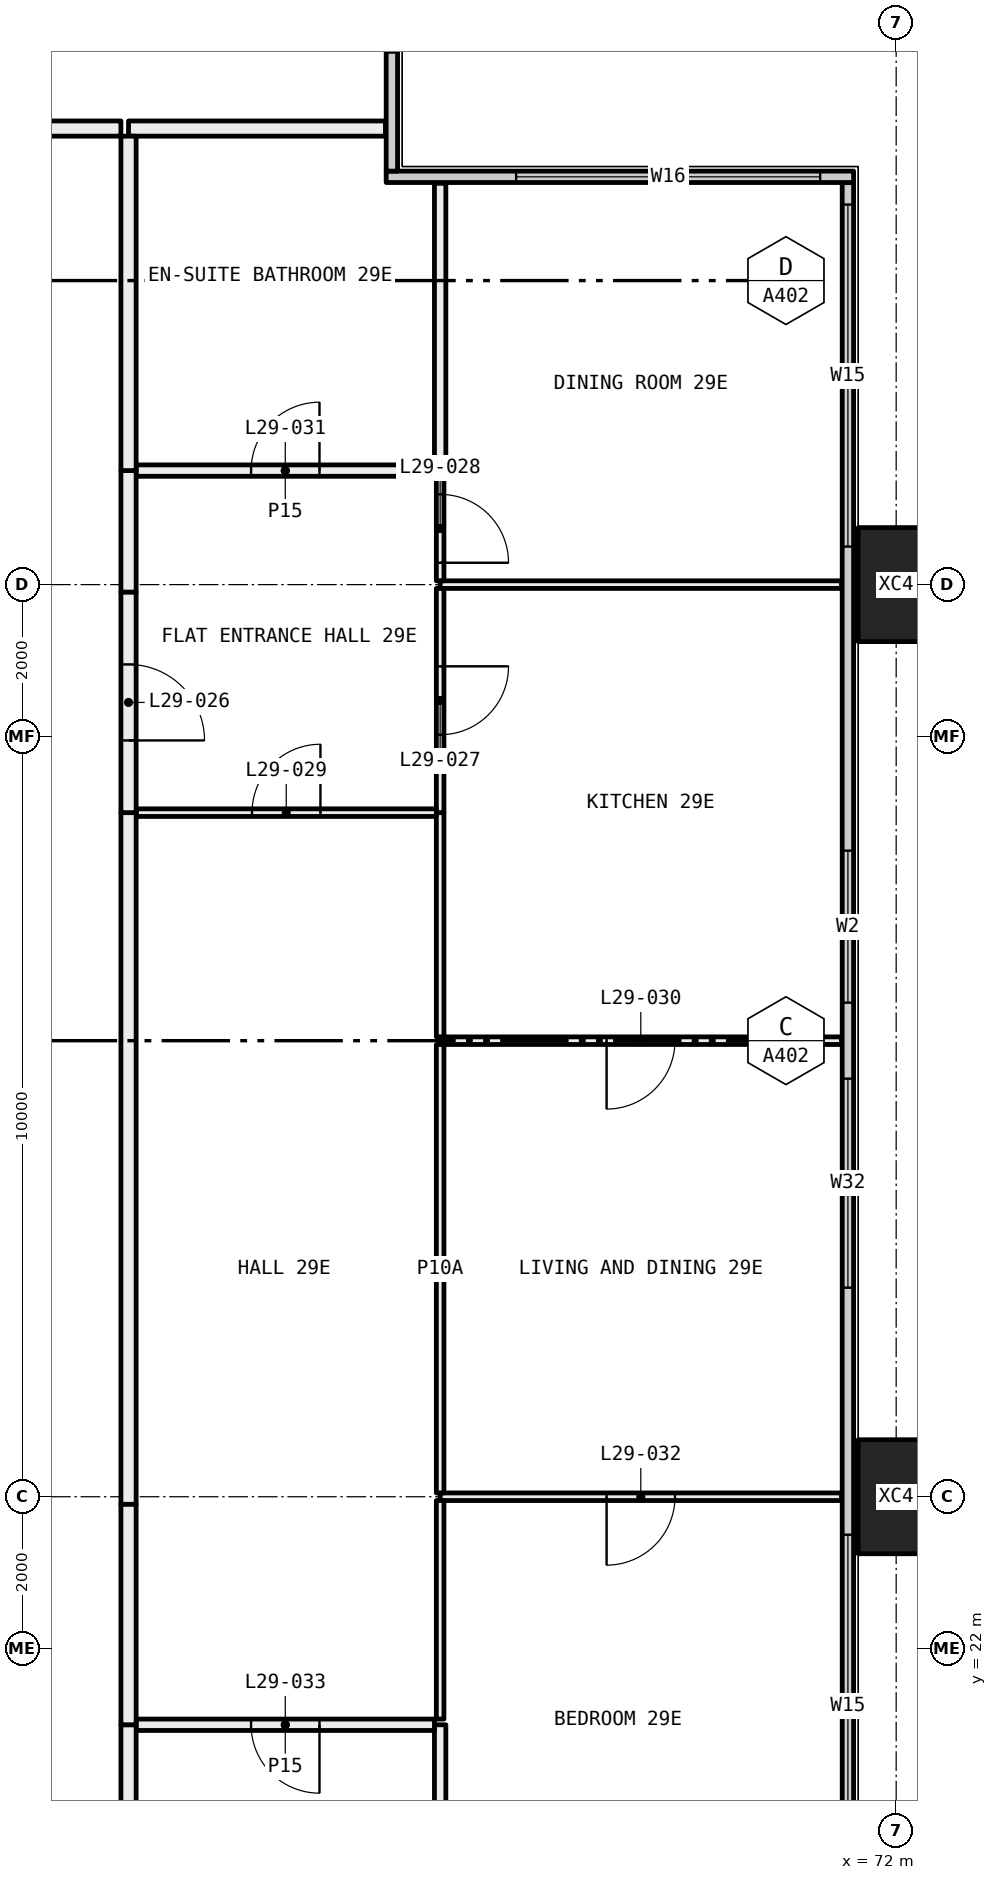
"""IFC4 building model, lengths in metres.
Left out: names, types, materials, properties, quantities, classifications, styles, units other than length and angle.
Written with IfcOpenShell. Run it as: python <this file> out.ifc"""

import sys

from ifc_helpers import new_model, si_unit, direction, frame, frame_2d, origin, origin_2d, place, context, subcontext, project, spatial, rectangle, hollow_rectangle, extrude, element, fill, save


model = new_model("IFC4")
c1 = context("Model", 3, precision=1e-05, world=origin(), true_north=direction((0.0, 1.0)))
c2 = subcontext(c1, "Body", "Model", "MODEL_VIEW")
j1 = project(units=[si_unit("LENGTHUNIT", "METRE"), si_unit("PLANEANGLEUNIT", "RADIAN")], contexts=[c1])
p1 = place(None, origin())
s1 = spatial("IfcSite", under=j1, at=p1, CompositionType="ELEMENT")
p2 = place(p1, origin())
s2 = spatial("IfcBuilding", under=s1, at=p2, CompositionType="ELEMENT")
p3 = place(p2, frame((0.0, 0.0, 113.85)))
s3 = spatial("IfcBuildingStorey", under=s2, at=p3, CompositionType="ELEMENT", Elevation=113.85)
for number, where, z_axis, x_axis in (
    (1, (72.0, 24.0, -0.4), (0.0, 0.0, 1.0), (0.0, 1.0, 0.0)),
    (2, (72.0, 36.0, -0.4), (0.0, 0.0, 1.0), (0.0, 1.0, 0.0)),
):
    element("IfcColumn", number, at=place(p3, frame(where, z_axis=z_axis, x_axis=x_axis)), inside=s3, PredefinedType="COLUMN", context=c2, shape_type="SweptSolid", body=[
        extrude(hollow_rectangle(XDim=1.5, YDim=1.0, WallThickness=0.06, at=origin_2d()), origin(), (0.0, 0.0, 1.0), 3.45),
    ])
p4 = place(p3, frame((71.365, 18.71, 0.0), z_axis=(0.0, 0.0, 1.0), x_axis=(0.0, 1.0, 0.0)))
e3 = element("IfcWall", 3, at=p4, inside=s3, PredefinedType="ELEMENTEDWALL", context=c2, shape_type="SweptSolid", body=[
    extrude(rectangle(XDim=22.58, YDim=0.15, at=frame_2d((11.29, 0.0))), origin(), (0.0, 0.0, 1.0), 3.05),
])
p5 = place(p4, frame((0.29, 0.0, 0.45)))
e4 = element("IfcOpeningElement", 4, at=p5, cuts=e3, PredefinedType="OPENING", context=c2, shape_type="SweptSolid", body=[
    extrude(rectangle(XDim=4.5, YDim=2.55, at=frame_2d((2.25, 1.275))), frame((0.0, 0.085, 0.0), z_axis=(0.0, -1.0, 0.0), x_axis=(1.0, 0.0, 0.0)), (0.0, 0.0, 1.0), 0.17),
])
p6 = place(p4, frame((8.04, 0.0, 0.45)))
e5 = element("IfcOpeningElement", 5, at=p6, cuts=e3, PredefinedType="OPENING", context=c2, shape_type="SweptSolid", body=[
    extrude(rectangle(XDim=2.75, YDim=2.55, at=frame_2d((1.375, 1.275))), frame((0.0, 0.085, 0.0), z_axis=(0.0, -1.0, 0.0), x_axis=(1.0, 0.0, 0.0)), (0.0, 0.0, 1.0), 0.17),
])
p7 = place(p4, frame((11.79, 0.0, 0.45)))
e6 = element("IfcOpeningElement", 6, at=p7, cuts=e3, PredefinedType="OPENING", context=c2, shape_type="SweptSolid", body=[
    extrude(rectangle(XDim=2.0, YDim=2.55, at=frame_2d((1.0, 1.275))), frame((0.0, 0.085, 0.0), z_axis=(0.0, -1.0, 0.0), x_axis=(1.0, 0.0, 0.0)), (0.0, 0.0, 1.0), 0.17),
])
p8 = place(p4, frame((17.79, 0.0, 0.45)))
e7 = element("IfcOpeningElement", 7, at=p8, cuts=e3, PredefinedType="OPENING", context=c2, shape_type="SweptSolid", body=[
    extrude(rectangle(XDim=4.5, YDim=2.55, at=frame_2d((2.25, 1.275))), frame((0.0, 0.085, 0.0), z_axis=(0.0, -1.0, 0.0), x_axis=(1.0, 0.0, 0.0)), (0.0, 0.0, 1.0), 0.17),
])
p9 = place(p3, frame((65.29, 41.365, 0.0), z_axis=(0.0, 0.0, 1.0), x_axis=(1.0, 0.0, 0.0)))
e8 = element("IfcWall", 8, at=p9, inside=s3, PredefinedType="ELEMENTEDWALL", context=c2, shape_type="SweptSolid", body=[
    extrude(rectangle(XDim=6.15, YDim=0.15, at=frame_2d((3.075, 0.0))), origin(), (0.0, 0.0, 1.0), 3.05),
])
p10 = place(p9, frame((1.71, 0.0, 0.45)))
e9 = element("IfcOpeningElement", 9, at=p10, cuts=e8, PredefinedType="OPENING", context=c2, shape_type="SweptSolid", body=[
    extrude(rectangle(XDim=4.0, YDim=2.55, at=frame_2d((2.0, 1.275))), frame((0.0, 0.085, 0.0), z_axis=(0.0, -1.0, 0.0), x_axis=(1.0, 0.0, 0.0)), (0.0, 0.0, 1.0), 0.17),
])
p11 = place(p3, frame((65.365, 41.44, 0.0), z_axis=(0.0, 0.0, 1.0), x_axis=(0.0, 1.0, 0.0)))
e10 = element("IfcWall", 10, at=p11, inside=s3, PredefinedType="ELEMENTEDWALL", context=c2, shape_type="SweptSolid", body=[
    extrude(rectangle(XDim=5.85, YDim=0.15, at=frame_2d((2.925, 0.0))), origin(), (0.0, 0.0, 1.0), 3.05),
])
p12 = place(p11, frame((1.56, 0.0, 0.45)))
e11 = element("IfcOpeningElement", 11, at=p12, cuts=e10, PredefinedType="OPENING", context=c2, shape_type="SweptSolid", body=[
    extrude(rectangle(XDim=4.0, YDim=2.55, at=frame_2d((2.0, 1.275))), frame((0.0, 0.085, 0.0), z_axis=(0.0, -1.0, 0.0), x_axis=(1.0, 0.0, 0.0)), (0.0, 0.0, 1.0), 0.17),
])
p13 = place(p3, frame((71.28, 24.0, 0.0), z_axis=(0.0, 0.0, 1.0), x_axis=(-1.0, 0.0, 0.0)))
e12 = element("IfcWall", 12, at=p13, inside=s3, PredefinedType="PARTITIONING", context=c2, shape_type="SweptSolid", body=[
    extrude(rectangle(XDim=5.28, YDim=0.1, at=frame_2d((2.64, 0.0))), origin(), (0.0, 0.0, 1.0), 2.45),
])
p14 = place(p13, frame((2.19, 0.0, 0.0)))
e13 = element("IfcOpeningElement", 13, at=p14, cuts=e12, PredefinedType="OPENING", context=c2, shape_type="SweptSolid", body=[
    extrude(rectangle(XDim=0.9, YDim=2.1, at=frame_2d((0.45, 1.05))), frame((0.0, 0.06, 0.0), z_axis=(0.0, -1.0, 0.0), x_axis=(1.0, 0.0, 0.0)), (0.0, 0.0, 1.0), 0.12),
])
p15 = place(p3, frame((66.0, 21.0, 0.0), z_axis=(0.0, 0.0, 1.0), x_axis=(0.0, -1.0, 0.0)))
e14 = element("IfcWall", 14, at=p15, inside=s3, PredefinedType="PARTITIONING", context=c2, shape_type="SweptSolid", body=[
    extrude(rectangle(XDim=2.28, YDim=0.15, at=frame_2d((1.14, 0.0))), origin(), (0.0, 0.0, 1.0), 3.05),
])
p16 = place(p3, frame((66.0, 23.95, 0.0), z_axis=(0.0, 0.0, 1.0), x_axis=(0.0, -1.0, 0.0)))
e15 = element("IfcWall", 15, at=p16, inside=s3, PredefinedType="PARTITIONING", context=c2, shape_type="SweptSolid", body=[
    extrude(rectangle(XDim=2.875, YDim=0.1, at=frame_2d((1.438, 0.0))), origin(), (0.0, 0.0, 1.0), 2.45),
])
p17 = place(p3, frame((71.28, 30.0, 0.0), z_axis=(0.0, 0.0, 1.0), x_axis=(-1.0, 0.0, 0.0)))
e16 = element("IfcWall", 16, at=p17, inside=s3, PredefinedType="PARTITIONING", context=c2, shape_type="SweptSolid", body=[
    extrude(rectangle(XDim=5.28, YDim=0.1, at=frame_2d((2.64, 0.0))), origin(), (0.0, 0.0, 1.0), 3.05),
])
p18 = place(p17, frame((2.19, 0.0, 0.0)))
e17 = element("IfcOpeningElement", 17, at=p18, cuts=e16, PredefinedType="OPENING", context=c2, shape_type="SweptSolid", body=[
    extrude(rectangle(XDim=0.9, YDim=2.1, at=frame_2d((0.45, 1.05))), frame((0.0, 0.06, 0.0), z_axis=(0.0, -1.0, 0.0), x_axis=(1.0, 0.0, 0.0)), (0.0, 0.0, 1.0), 0.12),
])
p19 = place(p3, frame((66.0, 29.95, 0.0), z_axis=(0.0, 0.0, 1.0), x_axis=(0.0, -1.0, 0.0)))
e18 = element("IfcWall", 18, at=p19, inside=s3, PredefinedType="PARTITIONING", context=c2, shape_type="SweptSolid", body=[
    extrude(rectangle(XDim=5.9, YDim=0.1, at=frame_2d((2.95, 0.0))), origin(), (0.0, 0.0, 1.0), 2.45),
])
p20 = place(p3, frame((71.28, 36.0, 0.0), z_axis=(0.0, 0.0, 1.0), x_axis=(-1.0, 0.0, 0.0)))
e19 = element("IfcWall", 19, at=p20, inside=s3, PredefinedType="PARTITIONING", context=c2, shape_type="SweptSolid", body=[
    extrude(rectangle(XDim=5.28, YDim=0.1, at=frame_2d((2.64, 0.0))), origin(), (0.0, 0.0, 1.0), 2.45),
])
p21 = place(p3, frame((66.0, 33.0, 0.0), z_axis=(0.0, 0.0, 1.0), x_axis=(0.0, -1.0, 0.0)))
e20 = element("IfcWall", 20, at=p21, inside=s3, PredefinedType="PARTITIONING", context=c2, shape_type="SweptSolid", body=[
    extrude(rectangle(XDim=2.95, YDim=0.1, at=frame_2d((1.475, 0.0))), origin(), (0.0, 0.0, 1.0), 3.05),
])
p22 = place(p3, frame((66.0, 35.95, 0.0), z_axis=(0.0, 0.0, 1.0), x_axis=(0.0, -1.0, 0.0)))
e21 = element("IfcWall", 21, at=p22, inside=s3, PredefinedType="PARTITIONING", context=c2, shape_type="SweptSolid", body=[
    extrude(rectangle(XDim=2.95, YDim=0.1, at=frame_2d((1.475, 0.0))), origin(), (0.0, 0.0, 1.0), 2.45),
])
p23 = place(p22, frame((1.025, 0.0, 0.0)))
e22 = element("IfcOpeningElement", 22, at=p23, cuts=e21, PredefinedType="OPENING", context=c2, shape_type="SweptSolid", body=[
    extrude(rectangle(XDim=0.9, YDim=2.1, at=frame_2d((0.45, 1.05))), frame((0.0, 0.06, 0.0), z_axis=(0.0, -1.0, 0.0), x_axis=(1.0, 0.0, 0.0)), (0.0, 0.0, 1.0), 0.12),
])
p24 = place(p3, frame((66.0, 37.425, 0.0), z_axis=(0.0, 0.0, 1.0), x_axis=(0.0, -1.0, 0.0)))
e23 = element("IfcWall", 23, at=p24, inside=s3, PredefinedType="PARTITIONING", context=c2, shape_type="SweptSolid", body=[
    extrude(rectangle(XDim=1.375, YDim=0.1, at=frame_2d((0.688, 0.0))), origin(), (0.0, 0.0, 1.0), 2.45),
])
p25 = place(p24, frame((0.238, 0.0, 0.0)))
e24 = element("IfcOpeningElement", 24, at=p25, cuts=e23, PredefinedType="OPENING", context=c2, shape_type="SweptSolid", body=[
    extrude(rectangle(XDim=0.9, YDim=2.1, at=frame_2d((0.45, 1.05))), frame((0.0, 0.06, 0.0), z_axis=(0.0, -1.0, 0.0), x_axis=(1.0, 0.0, 0.0)), (0.0, 0.0, 1.0), 0.12),
])
p26 = place(p3, frame((66.0, 41.28, 0.0), z_axis=(0.0, 0.0, 1.0), x_axis=(0.0, -1.0, 0.0)))
e25 = element("IfcWall", 25, at=p26, inside=s3, PredefinedType="PARTITIONING", context=c2, shape_type="SweptSolid", body=[
    extrude(rectangle(XDim=3.78, YDim=0.15, at=frame_2d((1.89, 0.0))), origin(), (0.0, 0.0, 1.0), 3.05),
])
p27 = place(p3, frame((65.925, 21.0, 0.0), z_axis=(0.0, 0.0, 1.0), x_axis=(-1.0, 0.0, 0.0)))
e26 = element("IfcWall", 26, at=p27, inside=s3, PredefinedType="PARTITIONING", context=c2, shape_type="SweptSolid", body=[
    extrude(rectangle(XDim=3.925, YDim=0.15, at=frame_2d((1.962, 0.0))), origin(), (0.0, 0.0, 1.0), 3.05),
])
p28 = place(p27, frame((1.512, 0.0, 0.0)))
e27 = element("IfcOpeningElement", 27, at=p28, cuts=e26, PredefinedType="OPENING", context=c2, shape_type="SweptSolid", body=[
    extrude(rectangle(XDim=0.9, YDim=2.1, at=frame_2d((0.45, 1.05))), frame((0.0, 0.085, 0.0), z_axis=(0.0, -1.0, 0.0), x_axis=(1.0, 0.0, 0.0)), (0.0, 0.0, 1.0), 0.17),
])
p29 = place(p3, frame((61.9, 21.0, 0.0), z_axis=(0.0, 0.0, 1.0), x_axis=(0.0, -1.0, 0.0)))
e28 = element("IfcWall", 28, at=p29, inside=s3, PredefinedType="PARTITIONING", context=c2, shape_type="SweptSolid", body=[
    extrude(rectangle(XDim=2.9, YDim=0.2, at=frame_2d((1.45, 0.0))), origin(), (0.0, 0.0, 1.0), 3.05),
])
p30 = place(p3, frame((65.95, 33.0, 0.0), z_axis=(0.0, 0.0, 1.0), x_axis=(-1.0, 0.0, 0.0)))
e29 = element("IfcWall", 29, at=p30, inside=s3, PredefinedType="PARTITIONING", context=c2, shape_type="SweptSolid", body=[
    extrude(rectangle(XDim=3.95, YDim=0.1, at=frame_2d((1.975, 0.0))), origin(), (0.0, 0.0, 1.0), 3.05),
])
p31 = place(p30, frame((1.525, 0.0, 0.0)))
e30 = element("IfcOpeningElement", 30, at=p31, cuts=e29, PredefinedType="OPENING", context=c2, shape_type="SweptSolid", body=[
    extrude(rectangle(XDim=0.9, YDim=2.1, at=frame_2d((0.45, 1.05))), frame((0.0, 0.06, 0.0), z_axis=(0.0, -1.0, 0.0), x_axis=(1.0, 0.0, 0.0)), (0.0, 0.0, 1.0), 0.12),
])
p32 = place(p3, frame((61.9, 33.0, 0.0), z_axis=(0.0, 0.0, 1.0), x_axis=(0.0, -1.0, 0.0)))
e31 = element("IfcWall", 31, at=p32, inside=s3, PredefinedType="PARTITIONING", context=c2, shape_type="SweptSolid", body=[
    extrude(rectangle(XDim=9.1, YDim=0.2, at=frame_2d((4.55, 0.0))), origin(), (0.0, 0.0, 1.0), 2.45),
])
p33 = place(p3, frame((61.9, 23.9, 0.0), z_axis=(0.0, 0.0, 1.0), x_axis=(0.0, -1.0, 0.0)))
e32 = element("IfcWall", 32, at=p33, inside=s3, PredefinedType="PARTITIONING", context=c2, shape_type="SweptSolid", body=[
    extrude(rectangle(XDim=2.9, YDim=0.2, at=frame_2d((1.45, 0.0))), origin(), (0.0, 0.0, 1.0), 3.05),
])
p34 = place(p3, frame((65.925, 37.5, 0.0), z_axis=(0.0, 0.0, 1.0), x_axis=(-1.0, 0.0, 0.0)))
e33 = element("IfcWall", 33, at=p34, inside=s3, PredefinedType="PARTITIONING", context=c2, shape_type="SweptSolid", body=[
    extrude(rectangle(XDim=3.925, YDim=0.15, at=frame_2d((1.962, 0.0))), origin(), (0.0, 0.0, 1.0), 3.05),
])
p35 = place(p34, frame((1.512, 0.0, 0.0)))
e34 = element("IfcOpeningElement", 34, at=p35, cuts=e33, PredefinedType="OPENING", context=c2, shape_type="SweptSolid", body=[
    extrude(rectangle(XDim=0.9, YDim=2.1, at=frame_2d((0.45, 1.05))), frame((0.0, 0.085, 0.0), z_axis=(0.0, -1.0, 0.0), x_axis=(1.0, 0.0, 0.0)), (0.0, 0.0, 1.0), 0.17),
])
p36 = place(p3, frame((61.9, 37.5, 0.0), z_axis=(0.0, 0.0, 1.0), x_axis=(0.0, -1.0, 0.0)))
e35 = element("IfcWall", 35, at=p36, inside=s3, PredefinedType="PARTITIONING", context=c2, shape_type="SweptSolid", body=[
    extrude(rectangle(XDim=1.6, YDim=0.2, at=frame_2d((0.8, 0.0))), origin(), (0.0, 0.0, 1.0), 2.45),
])
p37 = place(p3, frame((61.9, 35.9, 0.0), z_axis=(0.0, 0.0, 1.0), x_axis=(0.0, -1.0, 0.0)))
e36 = element("IfcWall", 36, at=p37, inside=s3, PredefinedType="PARTITIONING", context=c2, shape_type="SweptSolid", body=[
    extrude(rectangle(XDim=2.9, YDim=0.2, at=frame_2d((1.45, 0.0))), origin(), (0.0, 0.0, 1.0), 3.05),
])
p38 = place(p37, frame((0.95, 0.0, 0.0)))
e37 = element("IfcOpeningElement", 37, at=p38, cuts=e36, PredefinedType="OPENING", context=c2, shape_type="SweptSolid", body=[
    extrude(rectangle(XDim=1.0, YDim=2.1, at=frame_2d((0.5, 1.05))), frame((0.0, 0.11, 0.0), z_axis=(0.0, -1.0, 0.0), x_axis=(1.0, 0.0, 0.0)), (0.0, 0.0, 1.0), 0.22),
])
p39 = place(p3, frame((65.28, 42.0, 0.0), z_axis=(0.0, 0.0, 1.0), x_axis=(-1.0, 0.0, 0.0)))
e38 = element("IfcWall", 38, at=p39, inside=s3, PredefinedType="PARTITIONING", context=c2, shape_type="SweptSolid", body=[
    extrude(rectangle(XDim=3.38, YDim=0.2, at=frame_2d((1.69, 0.0))), origin(), (0.0, 0.0, 1.0), 3.05),
])
p40 = place(p3, frame((61.9, 41.9, 0.0), z_axis=(0.0, 0.0, 1.0), x_axis=(0.0, -1.0, 0.0)))
e39 = element("IfcWall", 39, at=p40, inside=s3, PredefinedType="PARTITIONING", context=c2, shape_type="SweptSolid", body=[
    extrude(rectangle(XDim=4.4, YDim=0.2, at=frame_2d((2.2, 0.0))), origin(), (0.0, 0.0, 1.0), 3.05),
])
p41 = place(p3, frame((60.0, 42.0, 0.0), z_axis=(0.0, 0.0, 1.0), x_axis=(1.0, 0.0, 0.0)))
e40 = element("IfcWall", 40, at=p41, inside=s3, PredefinedType="PARTITIONING", context=c2, shape_type="SweptSolid", body=[
    extrude(rectangle(XDim=1.8, YDim=0.2, at=frame_2d((0.9, 0.0))), origin(), (0.0, 0.0, 1.0), 3.05),
])
p42 = place(p5, origin())
e41 = element("IfcWindow", 41, at=p42, inside=s3, PartitioningType="SINGLE_PANEL", PredefinedType="WINDOW", context=c2, shape_type="SweptSolid", body=[
    extrude(rectangle(XDim=4.5, YDim=2.55, at=frame_2d((2.25, 1.275))), frame((0.0, 0.03, 0.0), z_axis=(0.0, -1.0, 0.0), x_axis=(1.0, 0.0, 0.0)), (0.0, 0.0, 1.0), 0.06),
])
fill(e4, e41)
p43 = place(p6, origin())
e42 = element("IfcWindow", 42, at=p43, inside=s3, PartitioningType="SINGLE_PANEL", PredefinedType="WINDOW", context=c2, shape_type="SweptSolid", body=[
    extrude(rectangle(XDim=2.75, YDim=2.55, at=frame_2d((1.375, 1.275))), frame((0.0, 0.03, 0.0), z_axis=(0.0, -1.0, 0.0), x_axis=(1.0, 0.0, 0.0)), (0.0, 0.0, 1.0), 0.06),
])
fill(e5, e42)
p44 = place(p7, origin())
e43 = element("IfcWindow", 43, at=p44, inside=s3, PartitioningType="SINGLE_PANEL", PredefinedType="WINDOW", context=c2, shape_type="SweptSolid", body=[
    extrude(rectangle(XDim=2.0, YDim=2.55, at=frame_2d((1.0, 1.275))), frame((0.0, 0.03, 0.0), z_axis=(0.0, -1.0, 0.0), x_axis=(1.0, 0.0, 0.0)), (0.0, 0.0, 1.0), 0.06),
])
fill(e6, e43)
p45 = place(p8, origin())
e44 = element("IfcWindow", 44, at=p45, inside=s3, PartitioningType="SINGLE_PANEL", PredefinedType="WINDOW", context=c2, shape_type="SweptSolid", body=[
    extrude(rectangle(XDim=4.5, YDim=2.55, at=frame_2d((2.25, 1.275))), frame((0.0, 0.03, 0.0), z_axis=(0.0, -1.0, 0.0), x_axis=(1.0, 0.0, 0.0)), (0.0, 0.0, 1.0), 0.06),
])
fill(e7, e44)
p46 = place(p10, origin())
e45 = element("IfcWindow", 45, at=p46, inside=s3, PartitioningType="SINGLE_PANEL", PredefinedType="WINDOW", context=c2, shape_type="SweptSolid", body=[
    extrude(rectangle(XDim=4.0, YDim=2.55, at=frame_2d((2.0, 1.275))), frame((0.0, 0.03, 0.0), z_axis=(0.0, -1.0, 0.0), x_axis=(1.0, 0.0, 0.0)), (0.0, 0.0, 1.0), 0.06),
])
fill(e9, e45)
p47 = place(p38, origin())
e46 = element("IfcDoor", 46, at=p47, inside=s3, OperationType="SINGLE_SWING_LEFT", PredefinedType="DOOR", context=c2, shape_type="SweptSolid", body=[
    extrude(rectangle(XDim=1.0, YDim=2.1, at=frame_2d((0.5, 1.05))), frame((0.0, 0.025, 0.0), z_axis=(0.0, -1.0, 0.0), x_axis=(1.0, 0.0, 0.0)), (0.0, 0.0, 1.0), 0.05),
])
fill(e37, e46)
p48 = place(p23, origin())
e47 = element("IfcDoor", 47, at=p48, inside=s3, OperationType="SINGLE_SWING_RIGHT", PredefinedType="DOOR", context=c2, shape_type="SweptSolid", body=[
    extrude(rectangle(XDim=0.9, YDim=2.1, at=frame_2d((0.45, 1.05))), frame((0.0, 0.025, 0.0), z_axis=(0.0, -1.0, 0.0), x_axis=(1.0, 0.0, 0.0)), (0.0, 0.0, 1.0), 0.05),
])
fill(e22, e47)
p49 = place(p25, origin())
e48 = element("IfcDoor", 48, at=p49, inside=s3, OperationType="SINGLE_SWING_LEFT", PredefinedType="DOOR", context=c2, shape_type="SweptSolid", body=[
    extrude(rectangle(XDim=0.9, YDim=2.1, at=frame_2d((0.45, 1.05))), frame((0.0, 0.025, 0.0), z_axis=(0.0, -1.0, 0.0), x_axis=(1.0, 0.0, 0.0)), (0.0, 0.0, 1.0), 0.05),
])
fill(e24, e48)
p50 = place(p31, frame((0.9, 0.0, 0.0), x_axis=(-1.0, 0.0, 0.0)))
e49 = element("IfcDoor", 49, at=p50, inside=s3, OperationType="SINGLE_SWING_LEFT", PredefinedType="DOOR", context=c2, shape_type="SweptSolid", body=[
    extrude(rectangle(XDim=0.9, YDim=2.1, at=frame_2d((0.45, 1.05))), frame((0.0, 0.025, 0.0), z_axis=(0.0, -1.0, 0.0), x_axis=(1.0, 0.0, 0.0)), (0.0, 0.0, 1.0), 0.05),
])
fill(e30, e49)
p51 = place(p18, origin())
e50 = element("IfcDoor", 50, at=p51, inside=s3, OperationType="SINGLE_SWING_LEFT", PredefinedType="DOOR", context=c2, shape_type="SweptSolid", body=[
    extrude(rectangle(XDim=0.9, YDim=2.1, at=frame_2d((0.45, 1.05))), frame((0.0, 0.025, 0.0), z_axis=(0.0, -1.0, 0.0), x_axis=(1.0, 0.0, 0.0)), (0.0, 0.0, 1.0), 0.05),
])
fill(e17, e50)
p52 = place(p35, frame((0.9, 0.0, 0.0), x_axis=(-1.0, 0.0, 0.0)))
e51 = element("IfcDoor", 51, at=p52, inside=s3, OperationType="SINGLE_SWING_LEFT", PredefinedType="DOOR", context=c2, shape_type="SweptSolid", body=[
    extrude(rectangle(XDim=0.9, YDim=2.1, at=frame_2d((0.45, 1.05))), frame((0.0, 0.025, 0.0), z_axis=(0.0, -1.0, 0.0), x_axis=(1.0, 0.0, 0.0)), (0.0, 0.0, 1.0), 0.05),
])
fill(e34, e51)
p53 = place(p14, origin())
e52 = element("IfcDoor", 52, at=p53, inside=s3, OperationType="SINGLE_SWING_LEFT", PredefinedType="DOOR", context=c2, shape_type="SweptSolid", body=[
    extrude(rectangle(XDim=0.9, YDim=2.1, at=frame_2d((0.45, 1.05))), frame((0.0, 0.025, 0.0), z_axis=(0.0, -1.0, 0.0), x_axis=(1.0, 0.0, 0.0)), (0.0, 0.0, 1.0), 0.05),
])
fill(e13, e52)
p54 = place(p28, origin())
e53 = element("IfcDoor", 53, at=p54, inside=s3, OperationType="SINGLE_SWING_RIGHT", PredefinedType="DOOR", context=c2, shape_type="SweptSolid", body=[
    extrude(rectangle(XDim=0.9, YDim=2.1, at=frame_2d((0.45, 1.05))), frame((0.0, 0.025, 0.0), z_axis=(0.0, -1.0, 0.0), x_axis=(1.0, 0.0, 0.0)), (0.0, 0.0, 1.0), 0.05),
])
fill(e27, e53)
save(model, sys.argv[1])
